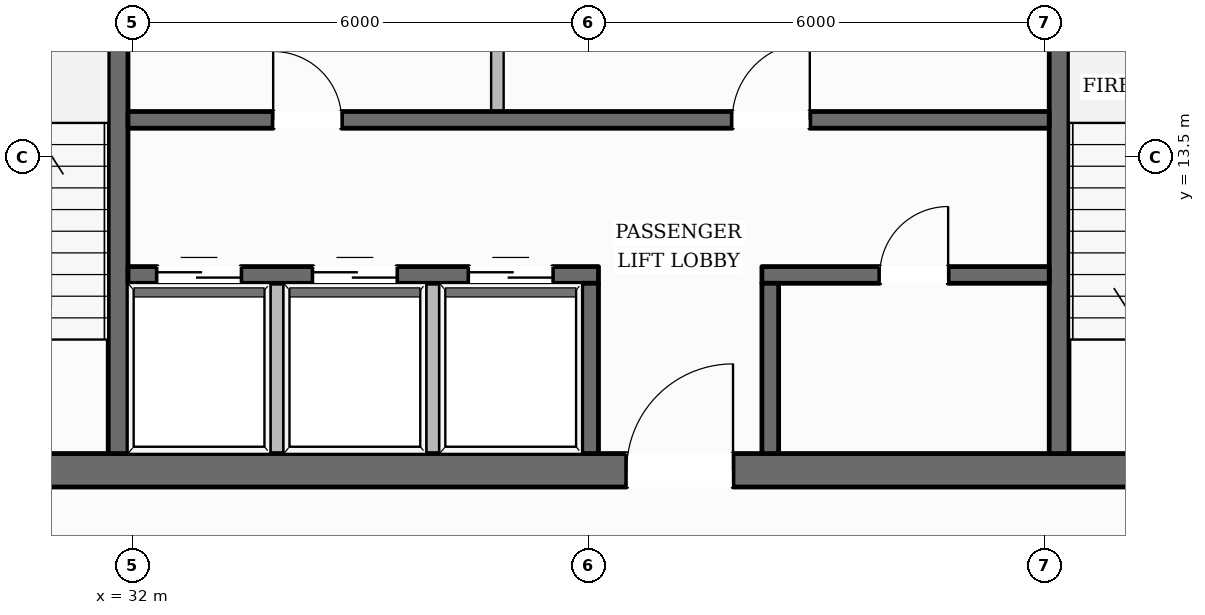
"""IFC4 building model, lengths in metres.
Left out: names, types, materials, properties, quantities, classifications, styles, units other than length and angle.
Written with IfcOpenShell. Run it as: python <this file> out.ifc"""

import sys

from ifc_helpers import new_model, si_unit, direction, frame, frame_2d, origin, place, context, subcontext, project, spatial, rectangle, extrude, element, fill, save


model = new_model("IFC4")
c1 = context("Model", 3, precision=1e-05, world=origin(), true_north=direction((0.0, 1.0)))
c2 = subcontext(c1, "Body", "Model", "MODEL_VIEW")
j1 = project(units=[si_unit("LENGTHUNIT", "METRE"), si_unit("PLANEANGLEUNIT", "RADIAN")], contexts=[c1])
p1 = place(None, origin())
s1 = spatial("IfcSite", under=j1, at=p1, CompositionType="ELEMENT")
p2 = place(p1, origin())
s2 = spatial("IfcBuilding", under=s1, at=p2, CompositionType="ELEMENT")
p3 = place(p2, frame((0.0, 0.0, 226.6)))
s3 = spatial("IfcBuildingStorey", under=s2, at=p3, CompositionType="ELEMENT", Elevation=226.6)
p4 = place(p3, frame((28.04, 9.38, 0.0), z_axis=(0.0, 0.0, 1.0), x_axis=(1.0, 0.0, 0.0)))
e1 = element("IfcWall", 1, at=p4, inside=s3, PredefinedType="SOLIDWALL", context=c2, shape_type="SweptSolid", body=[
    extrude(rectangle(XDim=19.92, YDim=0.44, at=frame_2d((9.96, 0.0))), origin(), (0.0, 0.0, 1.0), 3.6),
])
p5 = place(p4, frame((10.46, 0.0, 0.0)))
e2 = element("IfcOpeningElement", 2, at=p5, cuts=e1, PredefinedType="OPENING", context=c2, shape_type="SweptSolid", body=[
    extrude(rectangle(XDim=1.4, YDim=2.2, at=frame_2d((0.7, 1.1))), frame((0.0, 0.23, 0.0), z_axis=(0.0, -1.0, 0.0), x_axis=(1.0, 0.0, 0.0)), (0.0, 0.0, 1.0), 0.46),
])
p6 = place(p3, frame((31.81, 9.6, 0.0), z_axis=(0.0, 0.0, 1.0), x_axis=(0.0, 1.0, 0.0)))
e3 = element("IfcWall", 3, at=p6, inside=s3, PredefinedType="SHEAR", context=c2, shape_type="SweptSolid", body=[
    extrude(rectangle(XDim=13.0, YDim=0.26, at=frame_2d((6.5, 0.0))), origin(), (0.0, 0.0, 1.0), 3.6),
])
p7 = place(p6, frame((10.925, 0.0, 0.0)))
e4 = element("IfcOpeningElement", 4, at=p7, cuts=e3, PredefinedType="OPENING", context=c2, shape_type="SweptSolid", body=[
    extrude(rectangle(XDim=1.25, YDim=2.25, at=frame_2d((0.625, 1.125))), frame((0.0, 0.14, 0.0), z_axis=(0.0, -1.0, 0.0), x_axis=(1.0, 0.0, 0.0)), (0.0, 0.0, 1.0), 0.28),
])
p8 = place(p3, frame((44.19, 9.6, 0.0), z_axis=(0.0, 0.0, 1.0), x_axis=(0.0, 1.0, 0.0)))
e5 = element("IfcWall", 5, at=p8, inside=s3, PredefinedType="SHEAR", context=c2, shape_type="SweptSolid", body=[
    extrude(rectangle(XDim=13.0, YDim=0.26, at=frame_2d((6.5, 0.0))), origin(), (0.0, 0.0, 1.0), 3.6),
])
p9 = place(p8, frame((10.925, 0.0, 0.0)))
e6 = element("IfcOpeningElement", 6, at=p9, cuts=e5, PredefinedType="OPENING", context=c2, shape_type="SweptSolid", body=[
    extrude(rectangle(XDim=1.25, YDim=2.25, at=frame_2d((0.625, 1.125))), frame((0.0, 0.14, 0.0), z_axis=(0.0, -1.0, 0.0), x_axis=(1.0, 0.0, 0.0)), (0.0, 0.0, 1.0), 0.28),
])
p10 = place(p3, frame((31.94, 13.99, 0.0), z_axis=(0.0, 0.0, 1.0), x_axis=(1.0, 0.0, 0.0)))
e7 = element("IfcWall", 7, at=p10, inside=s3, PredefinedType="SOLIDWALL", context=c2, shape_type="SweptSolid", body=[
    extrude(rectangle(XDim=12.12, YDim=0.22, at=frame_2d((6.06, 0.0))), origin(), (0.0, 0.0, 1.0), 3.6),
])
p11 = place(p10, frame((1.91, 0.0, 0.0)))
e8 = element("IfcOpeningElement", 8, at=p11, cuts=e7, PredefinedType="OPENING", context=c2, shape_type="SweptSolid", body=[
    extrude(rectangle(XDim=0.9, YDim=2.1, at=frame_2d((0.45, 1.05))), frame((0.0, 0.12, 0.0), z_axis=(0.0, -1.0, 0.0), x_axis=(1.0, 0.0, 0.0)), (0.0, 0.0, 1.0), 0.24),
])
p12 = place(p10, frame((7.95, 0.0, 0.0)))
e9 = element("IfcOpeningElement", 9, at=p12, cuts=e7, PredefinedType="OPENING", context=c2, shape_type="SweptSolid", body=[
    extrude(rectangle(XDim=1.02, YDim=2.15, at=frame_2d((0.51, 1.075))), frame((0.0, 0.12, 0.0), z_axis=(0.0, -1.0, 0.0), x_axis=(1.0, 0.0, 0.0)), (0.0, 0.0, 1.0), 0.24),
])
p13 = place(p3, frame((31.94, 11.95, 0.0), z_axis=(0.0, 0.0, 1.0), x_axis=(1.0, 0.0, 0.0)))
e10 = element("IfcWall", 10, at=p13, inside=s3, PredefinedType="SOLIDWALL", context=c2, shape_type="SweptSolid", body=[
    extrude(rectangle(XDim=6.19, YDim=0.22, at=frame_2d((3.095, 0.0))), origin(), (0.0, 0.0, 1.0), 3.6),
])
p14 = place(p13, frame((0.385, 0.0, 0.0)))
e11 = element("IfcOpeningElement", 11, at=p14, cuts=e10, PredefinedType="OPENING", context=c2, shape_type="SweptSolid", body=[
    extrude(rectangle(XDim=1.1, YDim=2.2, at=frame_2d((0.55, 1.1))), frame((0.0, 0.12, 0.0), z_axis=(0.0, -1.0, 0.0), x_axis=(1.0, 0.0, 0.0)), (0.0, 0.0, 1.0), 0.24),
])
p15 = place(p13, frame((2.435, 0.0, 0.0)))
e12 = element("IfcOpeningElement", 12, at=p15, cuts=e10, PredefinedType="OPENING", context=c2, shape_type="SweptSolid", body=[
    extrude(rectangle(XDim=1.1, YDim=2.2, at=frame_2d((0.55, 1.1))), frame((0.0, 0.12, 0.0), z_axis=(0.0, -1.0, 0.0), x_axis=(1.0, 0.0, 0.0)), (0.0, 0.0, 1.0), 0.24),
])
p16 = place(p13, frame((4.485, 0.0, 0.0)))
e13 = element("IfcOpeningElement", 13, at=p16, cuts=e10, PredefinedType="OPENING", context=c2, shape_type="SweptSolid", body=[
    extrude(rectangle(XDim=1.1, YDim=2.2, at=frame_2d((0.55, 1.1))), frame((0.0, 0.12, 0.0), z_axis=(0.0, -1.0, 0.0), x_axis=(1.0, 0.0, 0.0)), (0.0, 0.0, 1.0), 0.24),
])
p17 = place(p3, frame((40.28, 11.95, 0.0), z_axis=(0.0, 0.0, 1.0), x_axis=(1.0, 0.0, 0.0)))
e14 = element("IfcWall", 14, at=p17, inside=s3, PredefinedType="SOLIDWALL", context=c2, shape_type="SweptSolid", body=[
    extrude(rectangle(XDim=3.78, YDim=0.22, at=frame_2d((1.89, 0.0))), origin(), (0.0, 0.0, 1.0), 3.6),
])
p18 = place(p17, frame((1.55, 0.0, 0.0)))
e15 = element("IfcOpeningElement", 15, at=p18, cuts=e14, PredefinedType="OPENING", context=c2, shape_type="SweptSolid", body=[
    extrude(rectangle(XDim=0.9, YDim=2.1, at=frame_2d((0.45, 1.05))), frame((0.0, 0.12, 0.0), z_axis=(0.0, -1.0, 0.0), x_axis=(1.0, 0.0, 0.0)), (0.0, 0.0, 1.0), 0.24),
])
for number, where, z_axis, x_axis in (
    (16, (38.02, 9.6, 0.0), (0.0, 0.0, 1.0), (0.0, 1.0, 0.0)),
    (17, (40.39, 9.6, 0.0), (0.0, 0.0, 1.0), (0.0, 1.0, 0.0)),
):
    element("IfcWall", number, at=place(p3, frame(where, z_axis=z_axis, x_axis=x_axis)), inside=s3, PredefinedType="SOLIDWALL", context=c2, shape_type="SweptSolid", body=[
        extrude(rectangle(XDim=2.24, YDim=0.22, at=frame_2d((1.12, 0.0))), origin(), (0.0, 0.0, 1.0), 3.6),
    ])
p19 = place(p3, frame((14.425, 10.865, 0.0), z_axis=(0.0, 0.0, 1.0), x_axis=(0.497768108872, 0.867310157781, 0.0)))
e18 = element("IfcWall", 18, at=p19, inside=s3, PredefinedType="STANDARD", context=c2, shape_type="SweptSolid", body=[
    extrude(rectangle(XDim=39.647, YDim=0.35, at=frame_2d((19.823, 0.0))), origin(), (0.0, 0.0, 1.0), 3.132),
])
p20 = place(p19, frame((35.221, 0.0, 0.65)))
e19 = element("IfcOpeningElement", 19, at=p20, cuts=e18, PredefinedType="OPENING", context=c2, shape_type="SweptSolid", body=[
    extrude(rectangle(XDim=1.45, YDim=1.75, at=frame_2d((0.725, 0.875))), frame((0.0, 0.185, 0.0), z_axis=(0.0, -1.0, 0.0), x_axis=(1.0, 0.0, 0.0)), (0.0, 0.0, 1.0), 0.37),
])
p21 = place(p19, frame((28.771, 0.0, 0.65)))
e20 = element("IfcOpeningElement", 20, at=p21, cuts=e18, PredefinedType="OPENING", context=c2, shape_type="SweptSolid", body=[
    extrude(rectangle(XDim=1.45, YDim=1.75, at=frame_2d((0.725, 0.875))), frame((0.0, 0.185, 0.0), z_axis=(0.0, -1.0, 0.0), x_axis=(1.0, 0.0, 0.0)), (0.0, 0.0, 1.0), 0.37),
])
p22 = place(p19, frame((15.872, 0.0, 0.65)))
e21 = element("IfcOpeningElement", 21, at=p22, cuts=e18, PredefinedType="OPENING", context=c2, shape_type="SweptSolid", body=[
    extrude(rectangle(XDim=1.45, YDim=1.75, at=frame_2d((0.725, 0.875))), frame((0.0, 0.185, 0.0), z_axis=(0.0, -1.0, 0.0), x_axis=(1.0, 0.0, 0.0)), (0.0, 0.0, 1.0), 0.37),
])
p23 = place(p19, frame((9.423, 0.0, 0.65)))
e22 = element("IfcOpeningElement", 22, at=p23, cuts=e18, PredefinedType="OPENING", context=c2, shape_type="SweptSolid", body=[
    extrude(rectangle(XDim=1.45, YDim=1.75, at=frame_2d((0.725, 0.875))), frame((0.0, 0.185, 0.0), z_axis=(0.0, -1.0, 0.0), x_axis=(1.0, 0.0, 0.0)), (0.0, 0.0, 1.0), 0.37),
])
p24 = place(p19, frame((2.973, 0.0, 0.65)))
e23 = element("IfcOpeningElement", 23, at=p24, cuts=e18, PredefinedType="OPENING", context=c2, shape_type="SweptSolid", body=[
    extrude(rectangle(XDim=1.45, YDim=1.75, at=frame_2d((0.725, 0.875))), frame((0.0, 0.185, 0.0), z_axis=(0.0, -1.0, 0.0), x_axis=(1.0, 0.0, 0.0)), (0.0, 0.0, 1.0), 0.37),
])
p25 = place(p3, frame((41.74, 45.312, 0.0), z_axis=(0.0, 0.0, 1.0), x_axis=(0.491560367125, -0.870843502285, 0.0)))
e24 = element("IfcWall", 24, at=p25, inside=s3, PredefinedType="STANDARD", context=c2, shape_type="SweptSolid", body=[
    extrude(rectangle(XDim=39.17, YDim=0.35, at=frame_2d((19.585, 0.0))), origin(), (0.0, 0.0, 1.0), 3.132),
])
p26 = place(p25, frame((34.788, 0.0, 0.65)))
e25 = element("IfcOpeningElement", 25, at=p26, cuts=e24, PredefinedType="OPENING", context=c2, shape_type="SweptSolid", body=[
    extrude(rectangle(XDim=1.45, YDim=1.75, at=frame_2d((0.725, 0.875))), frame((0.0, 0.185, 0.0), z_axis=(0.0, -1.0, 0.0), x_axis=(1.0, 0.0, 0.0)), (0.0, 0.0, 1.0), 0.37),
])
p27 = place(p25, frame((28.419, 0.0, 0.65)))
e26 = element("IfcOpeningElement", 26, at=p27, cuts=e24, PredefinedType="OPENING", context=c2, shape_type="SweptSolid", body=[
    extrude(rectangle(XDim=1.45, YDim=1.75, at=frame_2d((0.725, 0.875))), frame((0.0, 0.185, 0.0), z_axis=(0.0, -1.0, 0.0), x_axis=(1.0, 0.0, 0.0)), (0.0, 0.0, 1.0), 0.37),
])
p28 = place(p25, frame((15.68, 0.0, 0.65)))
e27 = element("IfcOpeningElement", 27, at=p28, cuts=e24, PredefinedType="OPENING", context=c2, shape_type="SweptSolid", body=[
    extrude(rectangle(XDim=1.45, YDim=1.75, at=frame_2d((0.725, 0.875))), frame((0.0, 0.185, 0.0), z_axis=(0.0, -1.0, 0.0), x_axis=(1.0, 0.0, 0.0)), (0.0, 0.0, 1.0), 0.37),
])
p29 = place(p25, frame((9.311, 0.0, 0.65)))
e28 = element("IfcOpeningElement", 28, at=p29, cuts=e24, PredefinedType="OPENING", context=c2, shape_type="SweptSolid", body=[
    extrude(rectangle(XDim=1.45, YDim=1.75, at=frame_2d((0.725, 0.875))), frame((0.0, 0.185, 0.0), z_axis=(0.0, -1.0, 0.0), x_axis=(1.0, 0.0, 0.0)), (0.0, 0.0, 1.0), 0.37),
])
p30 = place(p25, frame((2.942, 0.0, 0.65)))
e29 = element("IfcOpeningElement", 29, at=p30, cuts=e24, PredefinedType="OPENING", context=c2, shape_type="SweptSolid", body=[
    extrude(rectangle(XDim=1.45, YDim=1.75, at=frame_2d((0.725, 0.875))), frame((0.0, 0.185, 0.0), z_axis=(0.0, -1.0, 0.0), x_axis=(1.0, 0.0, 0.0)), (0.0, 0.0, 1.0), 0.37),
])
for number, where, z_axis, x_axis in (
    (30, (33.9, 9.52, 0.0), (0.0, 0.0, 1.0), (0.0, 1.0, 0.0)),
    (31, (35.95, 9.52, 0.0), (0.0, 0.0, 1.0), (0.0, 1.0, 0.0)),
):
    element("IfcWall", number, at=place(p3, frame(where, z_axis=z_axis, x_axis=x_axis)), inside=s3, PredefinedType="PARTITIONING", context=c2, shape_type="SweptSolid", body=[
        extrude(rectangle(XDim=2.32, YDim=0.165, at=frame_2d((1.16, 0.0))), origin(), (0.0, 0.0, 1.0), 3.6),
    ])
p31 = place(p3, frame((36.8, 14.1, 0.0), z_axis=(0.0, 0.0, 1.0), x_axis=(0.0, 1.0, 0.0)))
e32 = element("IfcWall", 32, at=p31, inside=s3, PredefinedType="PARTITIONING", context=c2, shape_type="SweptSolid", body=[
    extrude(rectangle(XDim=2.24, YDim=0.165, at=frame_2d((1.12, 0.0))), origin(), (0.0, 0.0, 1.0), 3.6),
])
p32 = place(p5, origin())
e33 = element("IfcDoor", 33, at=p32, inside=s3, OperationType="SINGLE_SWING_RIGHT", PredefinedType="DOOR", context=c2, shape_type="SweptSolid", body=[
    extrude(rectangle(XDim=1.4, YDim=2.2, at=frame_2d((0.7, 1.1))), frame((0.0, 0.025, 0.0), z_axis=(0.0, -1.0, 0.0), x_axis=(1.0, 0.0, 0.0)), (0.0, 0.0, 1.0), 0.05),
])
fill(e2, e33)
p33 = place(p14, origin())
e34 = element("IfcDoor", 34, at=p33, inside=s3, OperationType="DOUBLE_DOOR_SLIDING", PredefinedType="DOOR", context=c2, shape_type="SweptSolid", body=[
    extrude(rectangle(XDim=1.1, YDim=2.2, at=frame_2d((0.55, 1.1))), frame((0.0, 0.025, 0.0), z_axis=(0.0, -1.0, 0.0), x_axis=(1.0, 0.0, 0.0)), (0.0, 0.0, 1.0), 0.05),
])
fill(e11, e34)
p34 = place(p15, origin())
e35 = element("IfcDoor", 35, at=p34, inside=s3, OperationType="DOUBLE_DOOR_SLIDING", PredefinedType="DOOR", context=c2, shape_type="SweptSolid", body=[
    extrude(rectangle(XDim=1.1, YDim=2.2, at=frame_2d((0.55, 1.1))), frame((0.0, 0.025, 0.0), z_axis=(0.0, -1.0, 0.0), x_axis=(1.0, 0.0, 0.0)), (0.0, 0.0, 1.0), 0.05),
])
fill(e12, e35)
p35 = place(p16, origin())
e36 = element("IfcDoor", 36, at=p35, inside=s3, OperationType="DOUBLE_DOOR_SLIDING", PredefinedType="DOOR", context=c2, shape_type="SweptSolid", body=[
    extrude(rectangle(XDim=1.1, YDim=2.2, at=frame_2d((0.55, 1.1))), frame((0.0, 0.025, 0.0), z_axis=(0.0, -1.0, 0.0), x_axis=(1.0, 0.0, 0.0)), (0.0, 0.0, 1.0), 0.05),
])
fill(e13, e36)
p36 = place(p11, origin())
e37 = element("IfcDoor", 37, at=p36, inside=s3, OperationType="SINGLE_SWING_LEFT", PredefinedType="DOOR", context=c2, shape_type="SweptSolid", body=[
    extrude(rectangle(XDim=0.9, YDim=2.1, at=frame_2d((0.45, 1.05))), frame((0.0, 0.025, 0.0), z_axis=(0.0, -1.0, 0.0), x_axis=(1.0, 0.0, 0.0)), (0.0, 0.0, 1.0), 0.05),
])
fill(e8, e37)
p37 = place(p12, origin())
e38 = element("IfcDoor", 38, at=p37, inside=s3, OperationType="SINGLE_SWING_RIGHT", PredefinedType="DOOR", context=c2, shape_type="SweptSolid", body=[
    extrude(rectangle(XDim=1.02, YDim=2.15, at=frame_2d((0.51, 1.075))), frame((0.0, 0.025, 0.0), z_axis=(0.0, -1.0, 0.0), x_axis=(1.0, 0.0, 0.0)), (0.0, 0.0, 1.0), 0.05),
])
fill(e9, e38)
p38 = place(p18, origin())
e39 = element("IfcDoor", 39, at=p38, inside=s3, OperationType="SINGLE_SWING_RIGHT", PredefinedType="DOOR", context=c2, shape_type="SweptSolid", body=[
    extrude(rectangle(XDim=0.9, YDim=2.1, at=frame_2d((0.45, 1.05))), frame((0.0, 0.025, 0.0), z_axis=(0.0, -1.0, 0.0), x_axis=(1.0, 0.0, 0.0)), (0.0, 0.0, 1.0), 0.05),
])
fill(e15, e39)
save(model, sys.argv[1])
